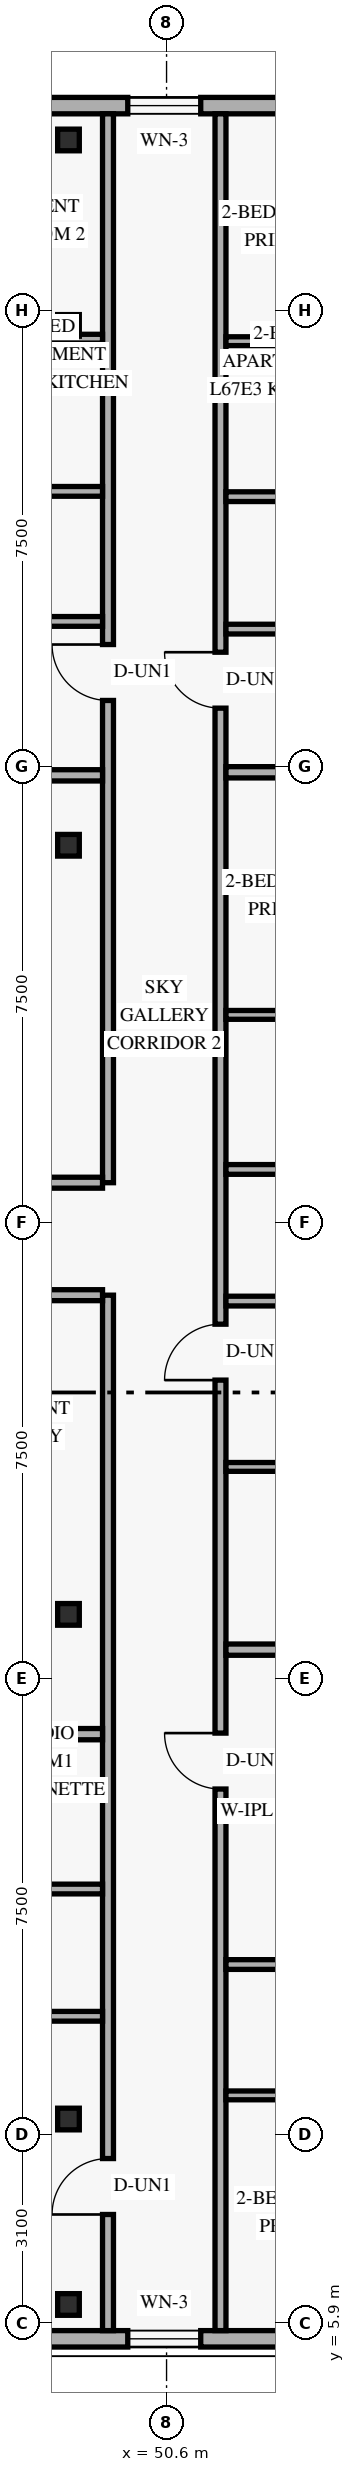
"""IFC4 building model, lengths in metres.
Left out: names, types, materials, properties, quantities, classifications, styles, units other than length and angle.
Written with IfcOpenShell. Run it as: python <this file> out.ifc"""

import sys

from ifc_helpers import new_model, si_unit, direction, frame, frame_2d, origin, origin_2d, place, context, subcontext, project, spatial, rectangle, hollow_rectangle, extrude, element, fill, save


model = new_model("IFC4")
c1 = context("Model", 3, precision=1e-05, world=origin(), true_north=direction((0.0, 1.0)))
c2 = subcontext(c1, "Body", "Model", "MODEL_VIEW")
j1 = project(units=[si_unit("LENGTHUNIT", "METRE"), si_unit("PLANEANGLEUNIT", "RADIAN")], contexts=[c1])
p1 = place(None, origin())
s1 = spatial("IfcSite", under=j1, at=p1, CompositionType="ELEMENT")
p2 = place(p1, origin())
s2 = spatial("IfcBuilding", under=s1, at=p2, CompositionType="ELEMENT")
p3 = place(p2, frame((0.0, 0.0, 256.8)))
s3 = spatial("IfcBuildingStorey", under=s2, at=p3, CompositionType="ELEMENT", Elevation=256.8)
for number, where, z_axis, x_axis in (
    (1, (48.924, 6.2, 0.0), (0.035, 0.0, 0.999), (0.0, 1.0, 0.0)),
    (2, (48.924, 9.25, 0.0), (0.035, 0.0, 0.999), (0.0, 1.0, 0.0)),
    (3, (48.924, 17.55, 0.0), (0.035, 0.0, 0.999), (0.0, 1.0, 0.0)),
    (4, (48.924, 30.2, 0.0), (0.035, 0.0, 0.999), (0.0, 1.0, 0.0)),
    (5, (48.924, 38.75, 0.0), (0.035, 0.0, 0.999), (0.0, 1.0, 0.0)),
    (6, (48.924, 41.8, 0.0), (0.035, 0.0, 0.999), (0.0, 1.0, 0.0)),
):
    element("IfcColumn", number, at=place(p3, frame(where, z_axis=z_axis, x_axis=x_axis)), inside=s3, PredefinedType="COLUMN", context=c2, shape_type="SweptSolid", body=[
        extrude(hollow_rectangle(XDim=0.356, YDim=0.356, WallThickness=0.016, at=origin_2d()), origin(), (0.0, 0.0, 1.0), 3.602),
    ])
p4 = place(p3, frame((25.82, 5.635, 0.0), z_axis=(0.0, 0.0, 1.0), x_axis=(1.0, 0.0, 0.0)))
e7 = element("IfcWall", 7, at=p4, inside=s3, PredefinedType="SOLIDWALL", context=c2, shape_type="SweptSolid", body=[
    extrude(rectangle(XDim=32.96, YDim=0.27, at=frame_2d((16.48, 0.0))), origin(), (0.0, 0.0, 1.0), 3.36),
])
p5 = place(p4, frame((3.57, 0.0, 0.85)))
e8 = element("IfcOpeningElement", 8, at=p5, cuts=e7, PredefinedType="OPENING", context=c2, shape_type="SweptSolid", body=[
    extrude(rectangle(XDim=1.8, YDim=1.6, at=frame_2d((0.9, 0.8))), frame((0.0, 0.145, 0.0), z_axis=(0.0, -1.0, 0.0), x_axis=(1.0, 0.0, 0.0)), (0.0, 0.0, 1.0), 0.29),
])
p6 = place(p4, frame((19.55, 0.0, 0.85)))
e9 = element("IfcOpeningElement", 9, at=p6, cuts=e7, PredefinedType="OPENING", context=c2, shape_type="SweptSolid", body=[
    extrude(rectangle(XDim=1.8, YDim=1.6, at=frame_2d((0.9, 0.8))), frame((0.0, 0.145, 0.0), z_axis=(0.0, -1.0, 0.0), x_axis=(1.0, 0.0, 0.0)), (0.0, 0.0, 1.0), 0.29),
])
p7 = place(p4, frame((24.142, 0.0, 0.85)))
e10 = element("IfcOpeningElement", 10, at=p7, cuts=e7, PredefinedType="OPENING", context=c2, shape_type="SweptSolid", body=[
    extrude(rectangle(XDim=1.2, YDim=1.5, at=frame_2d((0.6, 0.75))), frame((0.0, 0.145, 0.0), z_axis=(0.0, -1.0, 0.0), x_axis=(1.0, 0.0, 0.0)), (0.0, 0.0, 1.0), 0.29),
])
p8 = place(p4, frame((27.587, 0.0, 0.85)))
e11 = element("IfcOpeningElement", 11, at=p8, cuts=e7, PredefinedType="OPENING", context=c2, shape_type="SweptSolid", body=[
    extrude(rectangle(XDim=1.8, YDim=1.6, at=frame_2d((0.9, 0.8))), frame((0.0, 0.145, 0.0), z_axis=(0.0, -1.0, 0.0), x_axis=(1.0, 0.0, 0.0)), (0.0, 0.0, 1.0), 0.29),
])
p9 = place(p3, frame((58.78, 42.365, 0.0), z_axis=(0.0, 0.0, 1.0), x_axis=(-1.0, 0.0, 0.0)))
e12 = element("IfcWall", 12, at=p9, inside=s3, PredefinedType="SOLIDWALL", context=c2, shape_type="SweptSolid", body=[
    extrude(rectangle(XDim=32.96, YDim=0.27, at=frame_2d((16.48, 0.0))), origin(), (0.0, 0.0, 1.0), 3.36),
])
p10 = place(p9, frame((27.59, 0.0, 0.85)))
e13 = element("IfcOpeningElement", 13, at=p10, cuts=e12, PredefinedType="OPENING", context=c2, shape_type="SweptSolid", body=[
    extrude(rectangle(XDim=1.8, YDim=1.6, at=frame_2d((0.9, 0.8))), frame((0.0, 0.145, 0.0), z_axis=(0.0, -1.0, 0.0), x_axis=(1.0, 0.0, 0.0)), (0.0, 0.0, 1.0), 0.29),
])
p11 = place(p9, frame((16.085, 0.0, 0.85)))
e14 = element("IfcOpeningElement", 14, at=p11, cuts=e12, PredefinedType="OPENING", context=c2, shape_type="SweptSolid", body=[
    extrude(rectangle(XDim=1.8, YDim=1.6, at=frame_2d((0.9, 0.8))), frame((0.0, 0.145, 0.0), z_axis=(0.0, -1.0, 0.0), x_axis=(1.0, 0.0, 0.0)), (0.0, 0.0, 1.0), 0.29),
])
p12 = place(p9, frame((11.261, 0.0, 0.85)))
e15 = element("IfcOpeningElement", 15, at=p12, cuts=e12, PredefinedType="OPENING", context=c2, shape_type="SweptSolid", body=[
    extrude(rectangle(XDim=1.8, YDim=1.6, at=frame_2d((0.9, 0.8))), frame((0.0, 0.145, 0.0), z_axis=(0.0, -1.0, 0.0), x_axis=(1.0, 0.0, 0.0)), (0.0, 0.0, 1.0), 0.29),
])
p13 = place(p9, frame((7.618, 0.0, 0.85)))
e16 = element("IfcOpeningElement", 16, at=p13, cuts=e12, PredefinedType="OPENING", context=c2, shape_type="SweptSolid", body=[
    extrude(rectangle(XDim=1.2, YDim=1.5, at=frame_2d((0.6, 0.75))), frame((0.0, 0.145, 0.0), z_axis=(0.0, -1.0, 0.0), x_axis=(1.0, 0.0, 0.0)), (0.0, 0.0, 1.0), 0.29),
])
p14 = place(p9, frame((3.68, 0.0, 0.85)))
e17 = element("IfcOpeningElement", 17, at=p14, cuts=e12, PredefinedType="OPENING", context=c2, shape_type="SweptSolid", body=[
    extrude(rectangle(XDim=1.8, YDim=1.6, at=frame_2d((0.9, 0.8))), frame((0.0, 0.145, 0.0), z_axis=(0.0, -1.0, 0.0), x_axis=(1.0, 0.0, 0.0)), (0.0, 0.0, 1.0), 0.29),
])
p15 = place(p3, frame((49.637, 5.77, 0.0), z_axis=(0.0, 0.0, 1.0), x_axis=(0.0, 1.0, 0.0)))
e18 = element("IfcWall", 18, at=p15, inside=s3, PredefinedType="STANDARD", context=c2, shape_type="SweptSolid", body=[
    extrude(rectangle(XDim=17.03, YDim=0.18, at=frame_2d((8.515, 0.0))), origin(), (0.0, 0.0, 1.0), 2.803),
])
p16 = place(p15, frame((1.91, 0.0, 0.0)))
e19 = element("IfcOpeningElement", 19, at=p16, cuts=e18, PredefinedType="OPENING", context=c2, shape_type="SweptSolid", body=[
    extrude(rectangle(XDim=0.92, YDim=2.15, at=frame_2d((0.46, 1.075))), frame((0.0, 0.1, 0.0), z_axis=(0.0, -1.0, 0.0), x_axis=(1.0, 0.0, 0.0)), (0.0, 0.0, 1.0), 0.2),
])
p17 = place(p3, frame((49.637, 24.65, 0.0), z_axis=(0.0, 0.0, 1.0), x_axis=(0.0, 1.0, 0.0)))
e20 = element("IfcWall", 20, at=p17, inside=s3, PredefinedType="STANDARD", context=c2, shape_type="SweptSolid", body=[
    extrude(rectangle(XDim=17.58, YDim=0.18, at=frame_2d((8.79, 0.0))), origin(), (0.0, 0.0, 1.0), 2.803),
])
p18 = place(p17, frame((7.931, 0.0, 0.0)))
e21 = element("IfcOpeningElement", 21, at=p18, cuts=e20, PredefinedType="OPENING", context=c2, shape_type="SweptSolid", body=[
    extrude(rectangle(XDim=0.92, YDim=2.15, at=frame_2d((0.46, 1.075))), frame((0.0, 0.1, 0.0), z_axis=(0.0, -1.0, 0.0), x_axis=(1.0, 0.0, 0.0)), (0.0, 0.0, 1.0), 0.2),
])
p19 = place(p3, frame((37.64, 22.8, 0.0), z_axis=(0.0, 0.0, 1.0), x_axis=(1.0, 0.0, 0.0)))
e22 = element("IfcWall", 22, at=p19, inside=s3, PredefinedType="STANDARD", context=c2, shape_type="SweptSolid", body=[
    extrude(rectangle(XDim=11.907, YDim=0.18, at=frame_2d((5.954, 0.0))), origin(), (0.0, 0.0, 1.0), 2.803),
])
p20 = place(p19, frame((0.32, 0.0, 0.0)))
e23 = element("IfcOpeningElement", 23, at=p20, cuts=e22, PredefinedType="OPENING", context=c2, shape_type="SweptSolid", body=[
    extrude(rectangle(XDim=0.92, YDim=2.15, at=frame_2d((0.46, 1.075))), frame((0.0, 0.1, 0.0), z_axis=(0.0, -1.0, 0.0), x_axis=(1.0, 0.0, 0.0)), (0.0, 0.0, 1.0), 0.2),
])
p21 = place(p3, frame((37.64, 24.65, 0.0), z_axis=(0.0, 0.0, 1.0), x_axis=(1.0, 0.0, 0.0)))
e24 = element("IfcWall", 24, at=p21, inside=s3, PredefinedType="STANDARD", context=c2, shape_type="SweptSolid", body=[
    extrude(rectangle(XDim=11.907, YDim=0.18, at=frame_2d((5.954, 0.0))), origin(), (0.0, 0.0, 1.0), 2.803),
])
p22 = place(p21, frame((0.32, 0.0, 0.0)))
e25 = element("IfcOpeningElement", 25, at=p22, cuts=e24, PredefinedType="OPENING", context=c2, shape_type="SweptSolid", body=[
    extrude(rectangle(XDim=0.92, YDim=2.15, at=frame_2d((0.46, 1.075))), frame((0.0, 0.1, 0.0), z_axis=(0.0, -1.0, 0.0), x_axis=(1.0, 0.0, 0.0)), (0.0, 0.0, 1.0), 0.2),
])
p23 = place(p3, frame((51.487, 5.77, 0.0), z_axis=(0.0, 0.0, 1.0), x_axis=(0.0, 1.0, 0.0)))
e26 = element("IfcWall", 26, at=p23, inside=s3, PredefinedType="STANDARD", context=c2, shape_type="SweptSolid", body=[
    extrude(rectangle(XDim=36.46, YDim=0.18, at=frame_2d((18.23, 0.0))), origin(), (0.0, 0.0, 1.0), 2.803),
])
p24 = place(p23, frame((8.907, 0.0, 0.0)))
e27 = element("IfcOpeningElement", 27, at=p24, cuts=e26, PredefinedType="OPENING", context=c2, shape_type="SweptSolid", body=[
    extrude(rectangle(XDim=0.92, YDim=2.15, at=frame_2d((0.46, 1.075))), frame((0.0, 0.1, 0.0), z_axis=(0.0, -1.0, 0.0), x_axis=(1.0, 0.0, 0.0)), (0.0, 0.0, 1.0), 0.2),
])
p25 = place(p23, frame((15.633, 0.0, 0.0)))
e28 = element("IfcOpeningElement", 28, at=p25, cuts=e26, PredefinedType="OPENING", context=c2, shape_type="SweptSolid", body=[
    extrude(rectangle(XDim=0.92, YDim=2.15, at=frame_2d((0.46, 1.075))), frame((0.0, 0.1, 0.0), z_axis=(0.0, -1.0, 0.0), x_axis=(1.0, 0.0, 0.0)), (0.0, 0.0, 1.0), 0.2),
])
p26 = place(p23, frame((26.685, 0.0, 0.0)))
e29 = element("IfcOpeningElement", 29, at=p26, cuts=e26, PredefinedType="OPENING", context=c2, shape_type="SweptSolid", body=[
    extrude(rectangle(XDim=0.92, YDim=2.15, at=frame_2d((0.46, 1.075))), frame((0.0, 0.1, 0.0), z_axis=(0.0, -1.0, 0.0), x_axis=(1.0, 0.0, 0.0)), (0.0, 0.0, 1.0), 0.2),
])
p27 = place(p3, frame((51.577, 9.639, 0.0), z_axis=(0.0, 0.0, 1.0), x_axis=(1.0, 0.0, 0.0)))
e30 = element("IfcWall", 30, at=p27, inside=s3, PredefinedType="PARTITIONING", context=c2, shape_type="SweptSolid", body=[
    extrude(rectangle(XDim=10.553, YDim=0.145, at=frame_2d((5.276, 0.0))), origin(), (0.0, 0.0, 1.0), 2.879),
])
p28 = place(p27, frame((3.658, 0.0, 0.0)))
e31 = element("IfcOpeningElement", 31, at=p28, cuts=e30, PredefinedType="OPENING", context=c2, shape_type="SweptSolid", body=[
    extrude(rectangle(XDim=0.88, YDim=2.14, at=frame_2d((0.44, 1.07))), frame((0.0, 0.083, 0.0), z_axis=(0.0, -1.0, 0.0), x_axis=(1.0, 0.0, 0.0)), (0.0, 0.0, 1.0), 0.165),
])
p29 = place(p27, frame((7.717, 0.0, 0.0)))
e32 = element("IfcOpeningElement", 32, at=p29, cuts=e30, PredefinedType="OPENING", context=c2, shape_type="SweptSolid", body=[
    extrude(rectangle(XDim=0.88, YDim=2.14, at=frame_2d((0.44, 1.07))), frame((0.0, 0.083, 0.0), z_axis=(0.0, -1.0, 0.0), x_axis=(1.0, 0.0, 0.0)), (0.0, 0.0, 1.0), 0.165),
])
p30 = place(p3, frame((51.577, 14.317, 0.0), z_axis=(0.0, 0.0, 1.0), x_axis=(1.0, 0.0, 0.0)))
e33 = element("IfcWall", 33, at=p30, inside=s3, PredefinedType="PLUMBINGWALL", context=c2, shape_type="SweptSolid", body=[
    extrude(rectangle(XDim=2.636, YDim=0.16, at=frame_2d((1.318, 0.0))), origin(), (0.0, 0.0, 1.0), 3.36),
])
p31 = place(p3, frame((51.577, 11.791, 0.0), z_axis=(0.0, 0.0, 1.0), x_axis=(1.0, 0.0, 0.0)))
e34 = element("IfcWall", 34, at=p31, inside=s3, PredefinedType="PLUMBINGWALL", context=c2, shape_type="SweptSolid", body=[
    extrude(rectangle(XDim=2.476, YDim=0.16, at=frame_2d((1.238, 0.0))), origin(), (0.0, 0.0, 1.0), 3.36),
])
p32 = place(p3, frame((51.577, 16.97, 0.0), z_axis=(0.0, 0.0, 1.0), x_axis=(1.0, 0.0, 0.0)))
e35 = element("IfcWall", 35, at=p32, inside=s3, PredefinedType="PARTITIONING", context=c2, shape_type="SweptSolid", body=[
    extrude(rectangle(XDim=10.553, YDim=0.185, at=frame_2d((5.276, 0.0))), origin(), (0.0, 0.0, 1.0), 2.879),
])
p33 = place(p3, frame((51.577, 27.41, 0.0), z_axis=(0.0, 0.0, 1.0), x_axis=(1.0, 0.0, 0.0)))
e36 = element("IfcWall", 36, at=p33, inside=s3, PredefinedType="PARTITIONING", context=c2, shape_type="SweptSolid", body=[
    extrude(rectangle(XDim=10.553, YDim=0.145, at=frame_2d((5.276, 0.0))), origin(), (0.0, 0.0, 1.0), 2.879),
])
p34 = place(p33, frame((3.803, 0.0, 0.0)))
e37 = element("IfcOpeningElement", 37, at=p34, cuts=e36, PredefinedType="OPENING", context=c2, shape_type="SweptSolid", body=[
    extrude(rectangle(XDim=0.88, YDim=2.14, at=frame_2d((0.44, 1.07))), frame((0.0, 0.083, 0.0), z_axis=(0.0, -1.0, 0.0), x_axis=(1.0, 0.0, 0.0)), (0.0, 0.0, 1.0), 0.165),
])
p35 = place(p33, frame((7.823, 0.0, 0.0)))
e38 = element("IfcOpeningElement", 38, at=p35, cuts=e36, PredefinedType="OPENING", context=c2, shape_type="SweptSolid", body=[
    extrude(rectangle(XDim=0.88, YDim=2.14, at=frame_2d((0.44, 1.07))), frame((0.0, 0.083, 0.0), z_axis=(0.0, -1.0, 0.0), x_axis=(1.0, 0.0, 0.0)), (0.0, 0.0, 1.0), 0.165),
])
p36 = place(p3, frame((51.577, 22.703, 0.0), z_axis=(0.0, 0.0, 1.0), x_axis=(1.0, 0.0, 0.0)))
e39 = element("IfcWall", 39, at=p36, inside=s3, PredefinedType="PLUMBINGWALL", context=c2, shape_type="SweptSolid", body=[
    extrude(rectangle(XDim=2.712, YDim=0.16, at=frame_2d((1.356, 0.0))), origin(), (0.0, 0.0, 1.0), 3.36),
])
p37 = place(p3, frame((51.577, 24.868, 0.0), z_axis=(0.0, 0.0, 1.0), x_axis=(1.0, 0.0, 0.0)))
e40 = element("IfcWall", 40, at=p37, inside=s3, PredefinedType="PLUMBINGWALL", context=c2, shape_type="SweptSolid", body=[
    extrude(rectangle(XDim=2.552, YDim=0.16, at=frame_2d((1.276, 0.0))), origin(), (0.0, 0.0, 1.0), 3.36),
])
p38 = place(p3, frame((51.577, 19.975, 0.0), z_axis=(0.0, 0.0, 1.0), x_axis=(1.0, 0.0, 0.0)))
e41 = element("IfcWall", 41, at=p38, inside=s3, PredefinedType="PARTITIONING", context=c2, shape_type="SweptSolid", body=[
    extrude(rectangle(XDim=10.553, YDim=0.145, at=frame_2d((5.276, 0.0))), origin(), (0.0, 0.0, 1.0), 2.879),
])
p39 = place(p38, frame((5.247, 0.0, 0.0)))
e42 = element("IfcOpeningElement", 42, at=p39, cuts=e41, PredefinedType="OPENING", context=c2, shape_type="SweptSolid", body=[
    extrude(rectangle(XDim=0.95, YDim=2.15, at=frame_2d((0.475, 1.075))), frame((0.0, 0.083, 0.0), z_axis=(0.0, -1.0, 0.0), x_axis=(1.0, 0.0, 0.0)), (0.0, 0.0, 1.0), 0.165),
])
p40 = place(p3, frame((51.577, 31.4, 0.0), z_axis=(0.0, 0.0, 1.0), x_axis=(1.0, 0.0, 0.0)))
e43 = element("IfcWall", 43, at=p40, inside=s3, PredefinedType="PARTITIONING", context=c2, shape_type="SweptSolid", body=[
    extrude(rectangle(XDim=10.553, YDim=0.185, at=frame_2d((5.276, 0.0))), origin(), (0.0, 0.0, 1.0), 2.879),
])
p41 = place(p3, frame((51.577, 38.49, 0.0), z_axis=(0.0, 0.0, 1.0), x_axis=(1.0, 0.0, 0.0)))
e44 = element("IfcWall", 44, at=p41, inside=s3, PredefinedType="PARTITIONING", context=c2, shape_type="SweptSolid", body=[
    extrude(rectangle(XDim=10.553, YDim=0.145, at=frame_2d((5.276, 0.0))), origin(), (0.0, 0.0, 1.0), 2.879),
])
p42 = place(p41, frame((3.627, 0.0, 0.0)))
e45 = element("IfcOpeningElement", 45, at=p42, cuts=e44, PredefinedType="OPENING", context=c2, shape_type="SweptSolid", body=[
    extrude(rectangle(XDim=0.88, YDim=2.14, at=frame_2d((0.44, 1.07))), frame((0.0, 0.083, 0.0), z_axis=(0.0, -1.0, 0.0), x_axis=(1.0, 0.0, 0.0)), (0.0, 0.0, 1.0), 0.165),
])
p43 = place(p41, frame((7.61, 0.0, 0.0)))
e46 = element("IfcOpeningElement", 46, at=p43, cuts=e44, PredefinedType="OPENING", context=c2, shape_type="SweptSolid", body=[
    extrude(rectangle(XDim=0.88, YDim=2.14, at=frame_2d((0.44, 1.07))), frame((0.0, 0.083, 0.0), z_axis=(0.0, -1.0, 0.0), x_axis=(1.0, 0.0, 0.0)), (0.0, 0.0, 1.0), 0.165),
])
p44 = place(p3, frame((51.577, 33.755, 0.0), z_axis=(0.0, 0.0, 1.0), x_axis=(1.0, 0.0, 0.0)))
e47 = element("IfcWall", 47, at=p44, inside=s3, PredefinedType="PLUMBINGWALL", context=c2, shape_type="SweptSolid", body=[
    extrude(rectangle(XDim=2.788, YDim=0.16, at=frame_2d((1.394, 0.0))), origin(), (0.0, 0.0, 1.0), 3.36),
])
p45 = place(p3, frame((51.577, 35.933, 0.0), z_axis=(0.0, 0.0, 1.0), x_axis=(1.0, 0.0, 0.0)))
e48 = element("IfcWall", 48, at=p45, inside=s3, PredefinedType="PLUMBINGWALL", context=c2, shape_type="SweptSolid", body=[
    extrude(rectangle(XDim=2.628, YDim=0.16, at=frame_2d((1.314, 0.0))), origin(), (0.0, 0.0, 1.0), 3.36),
])
p46 = place(p3, frame((38.423, 15.58, 0.0), z_axis=(0.0, 0.0, 1.0), x_axis=(1.0, 0.0, 0.0)))
e49 = element("IfcWall", 49, at=p46, inside=s3, PredefinedType="PARTITIONING", context=c2, shape_type="SweptSolid", body=[
    extrude(rectangle(XDim=11.125, YDim=0.185, at=frame_2d((5.562, 0.0))), origin(), (0.0, 0.0, 1.0), 2.803),
])
p47 = place(p3, frame((46.713, 10.94, 0.0), z_axis=(0.0, 0.0, 1.0), x_axis=(1.0, 0.0, 0.0)))
e50 = element("IfcWall", 50, at=p47, inside=s3, PredefinedType="PLUMBINGWALL", context=c2, shape_type="SweptSolid", body=[
    extrude(rectangle(XDim=2.834, YDim=0.16, at=frame_2d((1.417, 0.0))), origin(), (0.0, 0.0, 1.0), 2.803),
])
p48 = place(p3, frame((46.873, 13.033, 0.0), z_axis=(0.0, 0.0, 1.0), x_axis=(1.0, 0.0, 0.0)))
e51 = element("IfcWall", 51, at=p48, inside=s3, PredefinedType="PLUMBINGWALL", context=c2, shape_type="SweptSolid", body=[
    extrude(rectangle(XDim=2.674, YDim=0.16, at=frame_2d((1.337, 0.0))), origin(), (0.0, 0.0, 1.0), 2.803),
])
p49 = place(p3, frame((38.972, 31.35, 0.0), z_axis=(0.0, 0.0, 1.0), x_axis=(1.0, 0.0, 0.0)))
e52 = element("IfcWall", 52, at=p49, inside=s3, PredefinedType="PARTITIONING", context=c2, shape_type="SweptSolid", body=[
    extrude(rectangle(XDim=10.575, YDim=0.185, at=frame_2d((5.287, 0.0))), origin(), (0.0, 0.0, 1.0), 2.803),
])
p50 = place(p3, frame((38.51, 38.531, 0.0), z_axis=(0.0, 0.0, 1.0), x_axis=(1.0, 0.0, 0.0)))
e53 = element("IfcWall", 53, at=p50, inside=s3, PredefinedType="PARTITIONING", context=c2, shape_type="SweptSolid", body=[
    extrude(rectangle(XDim=11.037, YDim=0.145, at=frame_2d((5.519, 0.0))), origin(), (0.0, 0.0, 1.0), 2.803),
])
p51 = place(p50, frame((2.845, 0.0, 0.0)))
e54 = element("IfcOpeningElement", 54, at=p51, cuts=e53, PredefinedType="OPENING", context=c2, shape_type="SweptSolid", body=[
    extrude(rectangle(XDim=0.88, YDim=2.14, at=frame_2d((0.44, 1.07))), frame((0.0, 0.083, 0.0), z_axis=(0.0, -1.0, 0.0), x_axis=(1.0, 0.0, 0.0)), (0.0, 0.0, 1.0), 0.165),
])
p52 = place(p50, frame((6.884, 0.0, 0.0)))
e55 = element("IfcOpeningElement", 55, at=p52, cuts=e53, PredefinedType="OPENING", context=c2, shape_type="SweptSolid", body=[
    extrude(rectangle(XDim=0.88, YDim=2.14, at=frame_2d((0.44, 1.07))), frame((0.0, 0.083, 0.0), z_axis=(0.0, -1.0, 0.0), x_axis=(1.0, 0.0, 0.0)), (0.0, 0.0, 1.0), 0.165),
])
p53 = place(p3, frame((46.987, 33.882, 0.0), z_axis=(0.0, 0.0, 1.0), x_axis=(1.0, 0.0, 0.0)))
e56 = element("IfcWall", 56, at=p53, inside=s3, PredefinedType="PLUMBINGWALL", context=c2, shape_type="SweptSolid", body=[
    extrude(rectangle(XDim=2.56, YDim=0.16, at=frame_2d((1.28, 0.0))), origin(), (0.0, 0.0, 1.0), 2.803),
])
p54 = place(p3, frame((47.147, 36.021, 0.0), z_axis=(0.0, 0.0, 1.0), x_axis=(1.0, 0.0, 0.0)))
e57 = element("IfcWall", 57, at=p54, inside=s3, PredefinedType="PLUMBINGWALL", context=c2, shape_type="SweptSolid", body=[
    extrude(rectangle(XDim=2.4, YDim=0.16, at=frame_2d((1.2, 0.0))), origin(), (0.0, 0.0, 1.0), 2.803),
])
p55 = place(p7, origin())
e58 = element("IfcWindow", 58, at=p55, inside=s3, PartitioningType="SINGLE_PANEL", PredefinedType="WINDOW", context=c2, shape_type="SweptSolid", body=[
    extrude(rectangle(XDim=1.2, YDim=1.5, at=frame_2d((0.6, 0.75))), frame((0.0, 0.03, 0.0), z_axis=(0.0, -1.0, 0.0), x_axis=(1.0, 0.0, 0.0)), (0.0, 0.0, 1.0), 0.06),
])
fill(e10, e58)
p56 = place(p13, origin())
e59 = element("IfcWindow", 59, at=p56, inside=s3, PartitioningType="SINGLE_PANEL", PredefinedType="WINDOW", context=c2, shape_type="SweptSolid", body=[
    extrude(rectangle(XDim=1.2, YDim=1.5, at=frame_2d((0.6, 0.75))), frame((0.0, 0.03, 0.0), z_axis=(0.0, -1.0, 0.0), x_axis=(1.0, 0.0, 0.0)), (0.0, 0.0, 1.0), 0.06),
])
fill(e16, e59)
p57 = place(p24, origin())
e60 = element("IfcDoor", 60, at=p57, inside=s3, OperationType="SINGLE_SWING_RIGHT", PredefinedType="DOOR", context=c2, shape_type="SweptSolid", body=[
    extrude(rectangle(XDim=0.92, YDim=2.15, at=frame_2d((0.46, 1.075))), frame((0.0, 0.025, 0.0), z_axis=(0.0, -1.0, 0.0), x_axis=(1.0, 0.0, 0.0)), (0.0, 0.0, 1.0), 0.05),
])
fill(e27, e60)
p58 = place(p25, origin())
e61 = element("IfcDoor", 61, at=p58, inside=s3, OperationType="SINGLE_SWING_LEFT", PredefinedType="DOOR", context=c2, shape_type="SweptSolid", body=[
    extrude(rectangle(XDim=0.92, YDim=2.15, at=frame_2d((0.46, 1.075))), frame((0.0, 0.025, 0.0), z_axis=(0.0, -1.0, 0.0), x_axis=(1.0, 0.0, 0.0)), (0.0, 0.0, 1.0), 0.05),
])
fill(e28, e61)
p59 = place(p26, origin())
e62 = element("IfcDoor", 62, at=p59, inside=s3, OperationType="SINGLE_SWING_RIGHT", PredefinedType="DOOR", context=c2, shape_type="SweptSolid", body=[
    extrude(rectangle(XDim=0.92, YDim=2.15, at=frame_2d((0.46, 1.075))), frame((0.0, 0.025, 0.0), z_axis=(0.0, -1.0, 0.0), x_axis=(1.0, 0.0, 0.0)), (0.0, 0.0, 1.0), 0.05),
])
fill(e29, e62)
p60 = place(p16, origin())
e63 = element("IfcDoor", 63, at=p60, inside=s3, OperationType="SINGLE_SWING_LEFT", PredefinedType="DOOR", context=c2, shape_type="SweptSolid", body=[
    extrude(rectangle(XDim=0.92, YDim=2.15, at=frame_2d((0.46, 1.075))), frame((0.0, 0.025, 0.0), z_axis=(0.0, -1.0, 0.0), x_axis=(1.0, 0.0, 0.0)), (0.0, 0.0, 1.0), 0.05),
])
fill(e19, e63)
p61 = place(p18, origin())
e64 = element("IfcDoor", 64, at=p61, inside=s3, OperationType="SINGLE_SWING_RIGHT", PredefinedType="DOOR", context=c2, shape_type="SweptSolid", body=[
    extrude(rectangle(XDim=0.92, YDim=2.15, at=frame_2d((0.46, 1.075))), frame((0.0, 0.025, 0.0), z_axis=(0.0, -1.0, 0.0), x_axis=(1.0, 0.0, 0.0)), (0.0, 0.0, 1.0), 0.05),
])
fill(e21, e64)
save(model, sys.argv[1])
